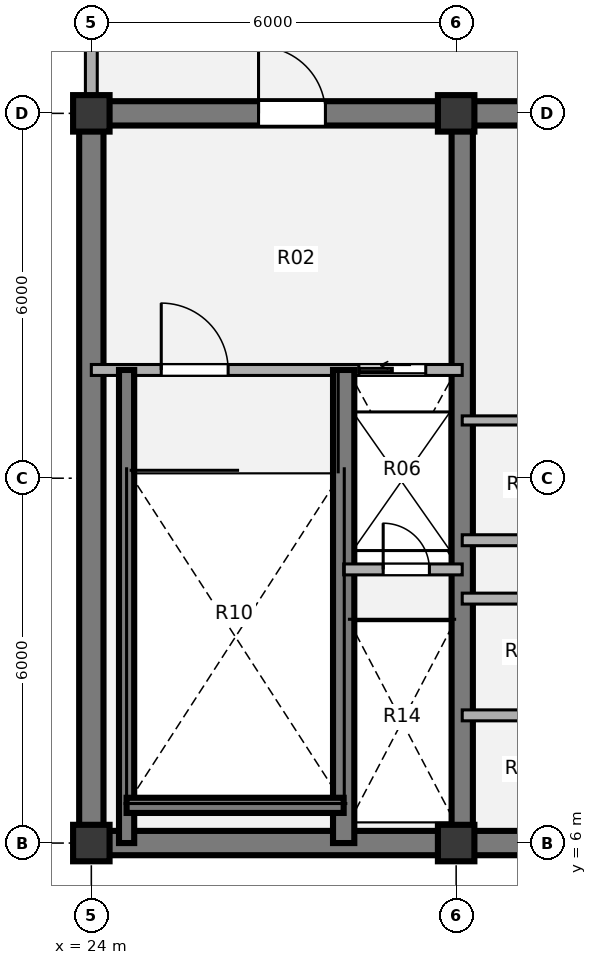
"""IFC4 building model, lengths in metres.
Left out: names, types, materials, properties, quantities, classifications, styles, units other than length and angle.
Written with IfcOpenShell. Run it as: python <this file> out.ifc"""

import sys

from ifc_helpers import new_model, si_unit, direction, frame, frame_2d, origin, origin_2d, place, context, subcontext, project, spatial, rectangle, extrude, source, transform, mapped, element, fill, save


model = new_model("IFC4")
c1 = context("Model", 3, precision=1e-05, world=origin(), true_north=direction((0.0, 1.0)))
c2 = subcontext(c1, "Body", "Model", "MODEL_VIEW")
j1 = project(units=[si_unit("LENGTHUNIT", "METRE"), si_unit("PLANEANGLEUNIT", "RADIAN")], contexts=[c1])
p1 = place(None, origin())
s1 = spatial("IfcSite", under=j1, at=p1, CompositionType="ELEMENT")
p2 = place(p1, origin())
s2 = spatial("IfcBuilding", under=s1, at=p2, CompositionType="ELEMENT")
p3 = place(p2, frame((0.0, 0.0, 315.72)))
s3 = spatial("IfcBuildingStorey", under=s2, at=p3, CompositionType="ELEMENT", Elevation=315.72)
m1 = source(origin(), c2, "Body", "SweptSolid", [
    extrude(rectangle(XDim=0.6, YDim=0.6, at=origin_2d()), origin(), (0.0, 0.0, 1.0), 3.96),
])
for number, where, z_axis, x_axis in (
    (1, (24.0, 6.0, 0.0), (0.0, 0.0, 1.0), (1.0, 0.0, 0.0)),
    (2, (30.0, 6.0, 0.0), (0.0, 0.0, 1.0), (1.0, 0.0, 0.0)),
    (3, (24.0, 18.0, 0.0), (0.0, 0.0, 1.0), (1.0, 0.0, 0.0)),
    (4, (30.0, 18.0, 0.0), (0.0, 0.0, 1.0), (1.0, 0.0, 0.0)),
):
    element("IfcColumn", number, at=place(p3, frame(where, z_axis=z_axis, x_axis=x_axis)), inside=s3, PredefinedType="COLUMN", context=c2, shape_type="MappedRepresentation", body=[
        mapped(m1, transform((0.0, 0.0, 0.0), x_axis=(1.0, 0.0, 0.0), y_axis=(0.0, 1.0, 0.0), z_axis=(0.0, 0.0, 1.0), scale=1.0)),
    ])
p4 = place(p3, frame((48.2, 6.0, 0.0), z_axis=(0.0, 0.0, 1.0), x_axis=(-1.0, 0.0, 0.0)))
e5 = element("IfcWall", 5, at=p4, inside=s3, PredefinedType="SHEAR", context=c2, shape_type="SweptSolid", body=[
    extrude(rectangle(XDim=24.4, YDim=0.4, at=frame_2d((12.2, 0.0))), origin(), (0.0, 0.0, 1.0), 3.96),
])
p5 = place(p3, frame((24.0, 6.0, 0.0), z_axis=(0.0, 0.0, 1.0), x_axis=(0.0, 1.0, 0.0)))
e6 = element("IfcWall", 6, at=p5, inside=s3, PredefinedType="SHEAR", context=c2, shape_type="SweptSolid", body=[
    extrude(rectangle(XDim=12.0, YDim=0.4, at=frame_2d((6.0, 0.0))), origin(), (0.0, 0.0, 1.0), 3.96),
])
p6 = place(p3, frame((23.8, 18.0, 0.0), z_axis=(0.0, 0.0, 1.0), x_axis=(1.0, 0.0, 0.0)))
e7 = element("IfcWall", 7, at=p6, inside=s3, PredefinedType="SHEAR", context=c2, shape_type="SweptSolid", body=[
    extrude(rectangle(XDim=9.4, YDim=0.4, at=frame_2d((4.7, 0.0))), origin(), (0.0, 0.0, 1.0), 3.96),
])
p7 = place(p6, frame((2.95, 0.0, 0.0)))
e8 = element("IfcOpeningElement", 8, at=p7, cuts=e7, PredefinedType="OPENING", context=c2, shape_type="SweptSolid", body=[
    extrude(rectangle(XDim=1.1, YDim=2.1, at=origin_2d()), frame((0.55, 0.21, 1.05), z_axis=(0.0, -1.0, 0.0), x_axis=(1.0, 0.0, 0.0)), (0.0, 0.0, 1.0), 0.42),
])
p8 = place(p3, frame((30.1, 6.0, 0.0), z_axis=(0.0, 0.0, 1.0), x_axis=(0.0, 1.0, 0.0)))
e9 = element("IfcWall", 9, at=p8, inside=s3, PredefinedType="SHEAR", context=c2, shape_type="SweptSolid", body=[
    extrude(rectangle(XDim=12.0, YDim=0.35, at=frame_2d((6.0, 0.0))), origin(), (0.0, 0.0, 1.0), 3.96),
])
p9 = place(p3, frame((24.0, 18.28, 0.0), z_axis=(0.0, 0.0, 1.0), x_axis=(0.0, 1.0, 0.0)))
e10 = element("IfcWall", 10, at=p9, inside=s3, PredefinedType="SOLIDWALL", context=c2, shape_type="SweptSolid", body=[
    extrude(rectangle(XDim=2.77, YDim=0.195, at=frame_2d((1.385, 0.0))), origin(), (0.0, 0.0, 1.0), 2.828),
])
p10 = place(p3, frame((30.1, 12.95, 0.0), z_axis=(0.0, 0.0, 1.0), x_axis=(1.0, 0.0, 0.0)))
e11 = element("IfcWall", 11, at=p10, inside=s3, PredefinedType="PARTITIONING", context=c2, shape_type="SweptSolid", body=[
    extrude(rectangle(XDim=2.5, YDim=0.15, at=frame_2d((1.25, 0.0))), origin(), (0.0, 0.0, 1.0), 3.61),
])
for number, where, z_axis, x_axis in (
    (12, (30.1, 10.98, 0.0), (0.0, 0.0, 1.0), (1.0, 0.0, 0.0)),
    (13, (30.1, 8.1, 0.0), (0.0, 0.0, 1.0), (1.0, 0.0, 0.0)),
    (14, (30.1, 10.02, 0.0), (0.0, 0.0, 1.0), (1.0, 0.0, 0.0)),
):
    element("IfcWall", number, at=place(p3, frame(where, z_axis=z_axis, x_axis=x_axis)), inside=s3, PredefinedType="PARTITIONING", context=c2, shape_type="SweptSolid", body=[
        extrude(rectangle(XDim=2.5, YDim=0.18, at=frame_2d((1.25, 0.0))), origin(), (0.0, 0.0, 1.0), 3.61),
    ])
p11 = place(p3, frame((24.0, 13.78, 0.0), z_axis=(0.0, 0.0, 1.0), x_axis=(1.0, 0.0, 0.0)))
e15 = element("IfcWall", 15, at=p11, inside=s3, PredefinedType="PARTITIONING", context=c2, shape_type="SweptSolid", body=[
    extrude(rectangle(XDim=6.1, YDim=0.18, at=frame_2d((3.05, 0.0))), origin(), (0.0, 0.0, 1.0), 3.61),
])
p12 = place(p11, frame((1.15, 0.0, 0.0)))
e16 = element("IfcOpeningElement", 16, at=p12, cuts=e15, PredefinedType="OPENING", context=c2, shape_type="SweptSolid", body=[
    extrude(rectangle(XDim=1.1, YDim=2.1, at=origin_2d()), frame((0.55, 0.1, 1.05), z_axis=(0.0, -1.0, 0.0), x_axis=(1.0, 0.0, 0.0)), (0.0, 0.0, 1.0), 0.2),
])
p13 = place(p11, frame((4.4, 0.0, 0.0)))
e17 = element("IfcOpeningElement", 17, at=p13, cuts=e15, PredefinedType="OPENING", context=c2, shape_type="SweptSolid", body=[
    extrude(rectangle(XDim=1.1, YDim=2.1, at=origin_2d()), frame((0.55, 0.1, 1.05), z_axis=(0.0, -1.0, 0.0), x_axis=(1.0, 0.0, 0.0)), (0.0, 0.0, 1.0), 0.2),
])
p14 = place(p3, frame((28.15, 6.0, 0.0), z_axis=(0.0, 0.0, 1.0), x_axis=(0.0, 1.0, 0.0)))
e18 = element("IfcWall", 18, at=p14, inside=s3, PredefinedType="SHEAR", context=c2, shape_type="SweptSolid", body=[
    extrude(rectangle(XDim=7.78, YDim=0.35, at=frame_2d((3.89, 0.0))), origin(), (0.0, 0.0, 1.0), 3.96),
])
p15 = place(p3, frame((24.58, 6.0, 0.0), z_axis=(0.0, 0.0, 1.0), x_axis=(0.0, 1.0, 0.0)))
e19 = element("IfcWall", 19, at=p15, inside=s3, PredefinedType="SHEAR", context=c2, shape_type="SweptSolid", body=[
    extrude(rectangle(XDim=7.78, YDim=0.25, at=frame_2d((3.89, 0.0))), origin(), (0.0, 0.0, 1.0), 3.96),
])
p16 = place(p3, frame((24.58, 6.62, 0.0), z_axis=(0.0, 0.0, 1.0), x_axis=(1.0, 0.0, 0.0)))
e20 = element("IfcWall", 20, at=p16, inside=s3, PredefinedType="SHEAR", context=c2, shape_type="SweptSolid", body=[
    extrude(rectangle(XDim=3.57, YDim=0.25, at=frame_2d((1.785, 0.0))), origin(), (0.0, 0.0, 1.0), 3.96),
])
p17 = place(p3, frame((28.15, 10.5, 0.0), z_axis=(0.0, 0.0, 1.0), x_axis=(1.0, 0.0, 0.0)))
e21 = element("IfcWall", 21, at=p17, inside=s3, PredefinedType="PARTITIONING", context=c2, shape_type="SweptSolid", body=[
    extrude(rectangle(XDim=1.95, YDim=0.18, at=frame_2d((0.975, 0.0))), origin(), (0.0, 0.0, 1.0), 3.61),
])
p18 = place(p17, frame((0.65, 0.0, 0.0)))
e22 = element("IfcOpeningElement", 22, at=p18, cuts=e21, PredefinedType="OPENING", context=c2, shape_type="SweptSolid", body=[
    extrude(rectangle(XDim=0.76, YDim=2.05, at=origin_2d()), frame((0.38, 0.1, 1.025), z_axis=(0.0, -1.0, 0.0), x_axis=(1.0, 0.0, 0.0)), (0.0, 0.0, 1.0), 0.2),
])
m2 = source(origin(), c2, "Body", "SweptSolid", [
    extrude(rectangle(XDim=1.1, YDim=2.1, at=origin_2d()), frame((0.55, 0.025, 1.05), z_axis=(0.0, -1.0, 0.0), x_axis=(1.0, 0.0, 0.0)), (0.0, 0.0, 1.0), 0.05),
])
p19 = place(p12, origin())
e23 = element("IfcDoor", 23, at=p19, inside=s3, OperationType="SINGLE_SWING_LEFT", PredefinedType="DOOR", context=c2, shape_type="MappedRepresentation", body=[
    mapped(m2, transform((0.0, 0.0, 0.0), x_axis=(1.0, 0.0, 0.0), y_axis=(0.0, 1.0, 0.0), z_axis=(0.0, 0.0, 1.0), scale=1.0)),
])
fill(e16, e23)
m3 = source(origin(), c2, "Body", "SweptSolid", [
    extrude(rectangle(XDim=1.1, YDim=2.1, at=origin_2d()), frame((0.55, 0.025, 1.05), z_axis=(0.0, -1.0, 0.0), x_axis=(1.0, 0.0, 0.0)), (0.0, 0.0, 1.0), 0.05),
])
p20 = place(p13, origin())
e24 = element("IfcDoor", 24, at=p20, inside=s3, OperationType="SLIDING_TO_LEFT", PredefinedType="DOOR", context=c2, shape_type="MappedRepresentation", body=[
    mapped(m3, transform((0.0, 0.0, 0.0), x_axis=(1.0, 0.0, 0.0), y_axis=(0.0, 1.0, 0.0), z_axis=(0.0, 0.0, 1.0), scale=1.0)),
])
fill(e17, e24)
m4 = source(origin(), c2, "Body", "SweptSolid", [
    extrude(rectangle(XDim=0.76, YDim=2.05, at=origin_2d()), frame((0.38, 0.025, 1.025), z_axis=(0.0, -1.0, 0.0), x_axis=(1.0, 0.0, 0.0)), (0.0, 0.0, 1.0), 0.05),
])
p21 = place(p18, origin())
e25 = element("IfcDoor", 25, at=p21, inside=s3, OperationType="SINGLE_SWING_LEFT", PredefinedType="DOOR", context=c2, shape_type="MappedRepresentation", body=[
    mapped(m4, transform((0.0, 0.0, 0.0), x_axis=(1.0, 0.0, 0.0), y_axis=(0.0, 1.0, 0.0), z_axis=(0.0, 0.0, 1.0), scale=1.0)),
])
fill(e22, e25)
m5 = source(origin(), c2, "Body", "SweptSolid", [
    extrude(rectangle(XDim=1.1, YDim=2.1, at=origin_2d()), frame((0.55, 0.025, 1.05), z_axis=(0.0, -1.0, 0.0), x_axis=(1.0, 0.0, 0.0)), (0.0, 0.0, 1.0), 0.05),
])
p22 = place(p7, origin())
e26 = element("IfcDoor", 26, at=p22, inside=s3, OperationType="SINGLE_SWING_LEFT", PredefinedType="DOOR", context=c2, shape_type="MappedRepresentation", body=[
    mapped(m5, transform((0.0, 0.0, 0.0), x_axis=(1.0, 0.0, 0.0), y_axis=(0.0, 1.0, 0.0), z_axis=(0.0, 0.0, 1.0), scale=1.0)),
])
fill(e8, e26)
save(model, sys.argv[1])
